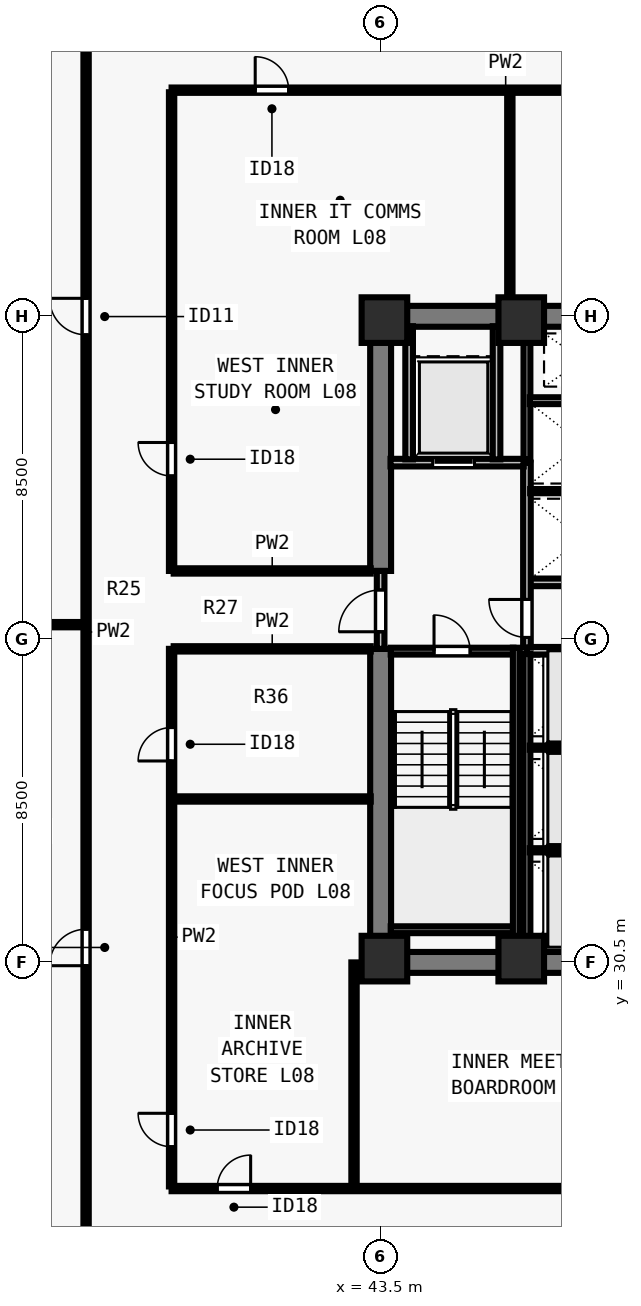
"""IFC4 building model, lengths in metres.
Left out: names, types, materials, properties, quantities, classifications, styles, units other than length and angle.
Written with IfcOpenShell. Run it as: python <this file> out.ifc"""

import sys

from ifc_helpers import new_model, si_unit, direction, frame, frame_2d, origin, origin_2d, place, context, subcontext, project, spatial, rectangle, extrude, element, fill, save


model = new_model("IFC4")
c1 = context("Model", 3, precision=1e-05, world=origin(), true_north=direction((0.0, 1.0)))
c2 = subcontext(c1, "Body", "Model", "MODEL_VIEW")
j1 = project(units=[si_unit("LENGTHUNIT", "METRE"), si_unit("PLANEANGLEUNIT", "RADIAN")], contexts=[c1])
p1 = place(None, origin())
s1 = spatial("IfcSite", under=j1, at=p1, CompositionType="ELEMENT")
p2 = place(p1, origin())
s2 = spatial("IfcBuilding", under=s1, at=p2, CompositionType="ELEMENT")
p3 = place(p2, frame((0.0, 0.0, 34.0)))
s3 = spatial("IfcBuildingStorey", under=s2, at=p3, CompositionType="ELEMENT", Elevation=34.0)
for number, where, z_axis, x_axis in (
    (1, (43.6, 30.6, 0.0), (0.0, 0.0, 1.0), (1.0, 0.0, 0.0)),
    (2, (47.2, 30.6, 0.0), (0.0, 0.0, 1.0), (1.0, 0.0, 0.0)),
    (3, (43.6, 47.4, 0.0), (0.0, 0.0, 1.0), (1.0, 0.0, 0.0)),
    (4, (47.2, 47.4, 0.0), (0.0, 0.0, 1.0), (1.0, 0.0, 0.0)),
):
    element("IfcColumn", number, at=place(p3, frame(where, z_axis=z_axis, x_axis=x_axis)), inside=s3, PredefinedType="COLUMN", context=c2, shape_type="SweptSolid", body=[
        extrude(rectangle(XDim=1.2, YDim=1.2, at=origin_2d()), origin(), (0.0, 0.0, 1.0), 3.5),
    ])
for number, where, z_axis, x_axis in (
    (5, (43.225, 30.5, 0.0), (0.0, 0.0, 1.0), (1.0, 0.0, 0.0)),
    (6, (43.225, 47.5, 0.0), (0.0, 0.0, 1.0), (1.0, 0.0, 0.0)),
):
    element("IfcWall", number, at=place(p3, frame(where, z_axis=z_axis, x_axis=x_axis)), inside=s3, PredefinedType="SHEAR", context=c2, shape_type="SweptSolid", body=[
        extrude(rectangle(XDim=17.55, YDim=0.55, at=frame_2d((8.775, 0.0))), origin(), (0.0, 0.0, 1.0), 3.28),
    ])
p4 = place(p3, frame((43.5, 30.765, 0.0), z_axis=(0.0, 0.0, 1.0), x_axis=(0.0, 1.0, 0.0)))
e7 = element("IfcWall", 7, at=p4, inside=s3, PredefinedType="SHEAR", context=c2, shape_type="SweptSolid", body=[
    extrude(rectangle(XDim=7.985, YDim=0.55, at=frame_2d((3.993, 0.0))), origin(), (0.0, 0.0, 1.0), 3.28),
])
p5 = place(p3, frame((43.5, 40.8, 0.0), z_axis=(0.0, 0.0, 1.0), x_axis=(0.0, 1.0, 0.0)))
e8 = element("IfcWall", 8, at=p5, inside=s3, PredefinedType="SHEAR", context=c2, shape_type="SweptSolid", body=[
    extrude(rectangle(XDim=6.435, YDim=0.55, at=frame_2d((3.218, 0.0))), origin(), (0.0, 0.0, 1.0), 3.28),
])
for number, where, z_axis, x_axis in (
    (9, (47.35, 38.7, 0.0), (0.0, 0.0, 1.0), (1.0, 0.0, 0.0)),
    (10, (47.35, 40.5, 0.0), (0.0, 0.0, 1.0), (1.0, 0.0, 0.0)),
):
    element("IfcWall", number, at=place(p3, frame(where, z_axis=z_axis, x_axis=x_axis)), inside=s3, PredefinedType="SOLIDWALL", context=c2, shape_type="SweptSolid", body=[
        extrude(rectangle(XDim=2.95, YDim=0.2, at=frame_2d((1.475, 0.0))), origin(), (0.0, 0.0, 1.0), 3.28),
    ])
p6 = place(p3, frame((43.5, 38.75, 0.0), z_axis=(0.0, 0.0, 1.0), x_axis=(0.0, 1.0, 0.0)))
e11 = element("IfcWall", 11, at=p6, inside=s3, PredefinedType="SOLIDWALL", context=c2, shape_type="SweptSolid", body=[
    extrude(rectangle(XDim=2.05, YDim=0.2, at=frame_2d((1.025, 0.0))), origin(), (0.0, 0.0, 1.0), 3.28),
])
p7 = place(p6, frame((0.45, 0.0, 0.0)))
e12 = element("IfcOpeningElement", 12, at=p7, cuts=e11, PredefinedType="OPENING", context=c2, shape_type="SweptSolid", body=[
    extrude(rectangle(XDim=1.1, YDim=2.15, at=frame_2d((0.55, 1.075))), frame((0.0, 0.11, 0.0), z_axis=(0.0, -1.0, 0.0), x_axis=(1.0, 0.0, 0.0)), (0.0, 0.0, 1.0), 0.22),
])
p8 = place(p3, frame((47.35, 38.785, 0.0), z_axis=(0.0, 0.0, 1.0), x_axis=(0.0, 1.0, 0.0)))
e13 = element("IfcWall", 13, at=p8, inside=s3, PredefinedType="SOLIDWALL", context=c2, shape_type="SweptSolid", body=[
    extrude(rectangle(XDim=4.865, YDim=0.2, at=frame_2d((2.433, 0.0))), origin(), (0.0, 0.0, 1.0), 3.28),
])
p9 = place(p8, frame((0.265, 0.0, 0.0)))
e14 = element("IfcOpeningElement", 14, at=p9, cuts=e13, PredefinedType="OPENING", context=c2, shape_type="SweptSolid", body=[
    extrude(rectangle(XDim=1.0, YDim=2.15, at=frame_2d((0.5, 1.075))), frame((0.0, 0.11, 0.0), z_axis=(0.0, -1.0, 0.0), x_axis=(1.0, 0.0, 0.0)), (0.0, 0.0, 1.0), 0.22),
])
p10 = place(p3, frame((43.76, 43.65, 0.0), z_axis=(0.0, 0.0, 1.0), x_axis=(1.0, 0.0, 0.0)))
e15 = element("IfcWall", 15, at=p10, inside=s3, PredefinedType="SOLIDWALL", context=c2, shape_type="SweptSolid", body=[
    extrude(rectangle(XDim=3.505, YDim=0.2, at=frame_2d((1.752, 0.0))), origin(), (0.0, 0.0, 1.0), 3.28),
])
p11 = place(p10, frame((1.11, 0.0, 0.0)))
e16 = element("IfcOpeningElement", 16, at=p11, cuts=e15, PredefinedType="OPENING", context=c2, shape_type="SweptSolid", body=[
    extrude(rectangle(XDim=1.1, YDim=2.2, at=frame_2d((0.55, 1.1))), frame((0.0, 0.11, 0.0), z_axis=(0.0, -1.0, 0.0), x_axis=(1.0, 0.0, 0.0)), (0.0, 0.0, 1.0), 0.22),
])
for number, where, z_axis, x_axis in (
    (17, (46.55, 43.735, 0.0), (0.0, 0.0, 1.0), (0.0, 1.0, 0.0)),
    (18, (44.25, 43.735, 0.0), (0.0, 0.0, 1.0), (0.0, 1.0, 0.0)),
):
    element("IfcWall", number, at=place(p3, frame(where, z_axis=z_axis, x_axis=x_axis)), inside=s3, PredefinedType="SOLIDWALL", context=c2, shape_type="SweptSolid", body=[
        extrude(rectangle(XDim=3.505, YDim=0.2, at=frame_2d((1.752, 0.0))), origin(), (0.0, 0.0, 1.0), 3.28),
    ])
p12 = place(p3, frame((47.35, 30.76, 0.0), z_axis=(0.0, 0.0, 1.0), x_axis=(0.0, 1.0, 0.0)))
e19 = element("IfcWall", 19, at=p12, inside=s3, PredefinedType="SOLIDWALL", context=c2, shape_type="SweptSolid", body=[
    extrude(rectangle(XDim=7.855, YDim=0.18, at=frame_2d((3.927, 0.0))), origin(), (0.0, 0.0, 1.0), 3.28),
])
for number, where, z_axis, x_axis in (
    (20, (47.425, 33.45, 0.0), (0.0, 0.0, 1.0), (1.0, 0.0, 0.0)),
    (21, (47.425, 36.15, 0.0), (0.0, 0.0, 1.0), (1.0, 0.0, 0.0)),
):
    element("IfcWall", number, at=place(p3, frame(where, z_axis=z_axis, x_axis=x_axis)), inside=s3, PredefinedType="PARTITIONING", context=c2, shape_type="SweptSolid", body=[
        extrude(rectangle(XDim=2.79, YDim=0.11, at=frame_2d((1.395, 0.0))), origin(), (0.0, 0.0, 1.0), 3.28),
    ])
p13 = place(p3, frame((47.35, 43.735, 0.0), z_axis=(0.0, 0.0, 1.0), x_axis=(0.0, 1.0, 0.0)))
e22 = element("IfcWall", 22, at=p13, inside=s3, PredefinedType="SOLIDWALL", context=c2, shape_type="SweptSolid", body=[
    extrude(rectangle(XDim=3.505, YDim=0.18, at=frame_2d((1.752, 0.0))), origin(), (0.0, 0.0, 1.0), 3.28),
])
p14 = place(p3, frame((47.435, 42.9, 0.0), z_axis=(0.0, 0.0, 1.0), x_axis=(1.0, 0.0, 0.0)))
e23 = element("IfcWall", 23, at=p14, inside=s3, PredefinedType="PARTITIONING", context=c2, shape_type="SweptSolid", body=[
    extrude(rectangle(XDim=2.78, YDim=0.11, at=frame_2d((1.39, 0.0))), origin(), (0.0, 0.0, 1.0), 3.28),
])
p15 = place(p3, frame((47.425, 45.28, 0.0), z_axis=(0.0, 0.0, 1.0), x_axis=(1.0, 0.0, 0.0)))
e24 = element("IfcWall", 24, at=p15, inside=s3, PredefinedType="SOLIDWALL", context=c2, shape_type="SweptSolid", body=[
    extrude(rectangle(XDim=2.79, YDim=0.18, at=frame_2d((1.395, 0.0))), origin(), (0.0, 0.0, 1.0), 3.28),
])
p16 = place(p3, frame((35.75, 22.355, 0.0), z_axis=(0.0, 0.0, 1.0), x_axis=(0.0, 1.0, 0.0)))
e25 = element("IfcWall", 25, at=p16, inside=s3, PredefinedType="PARTITIONING", context=c2, shape_type="SweptSolid", body=[
    extrude(rectangle(XDim=33.29, YDim=0.14, at=frame_2d((16.645, 0.0))), origin(), (0.0, 0.0, 1.0), 3.28),
])
p17 = place(p16, frame((8.058, 0.0, 0.0)))
e26 = element("IfcOpeningElement", 26, at=p17, cuts=e25, PredefinedType="OPENING", context=c2, shape_type="SweptSolid", body=[
    extrude(rectangle(XDim=0.96, YDim=2.12, at=frame_2d((0.48, 1.06))), frame((0.0, 0.08, 0.0), z_axis=(0.0, -1.0, 0.0), x_axis=(1.0, 0.0, 0.0)), (0.0, 0.0, 1.0), 0.16),
])
p18 = place(p16, frame((24.658, 0.0, 0.0)))
e27 = element("IfcOpeningElement", 27, at=p18, cuts=e25, PredefinedType="OPENING", context=c2, shape_type="SweptSolid", body=[
    extrude(rectangle(XDim=0.96, YDim=2.12, at=frame_2d((0.48, 1.06))), frame((0.0, 0.08, 0.0), z_axis=(0.0, -1.0, 0.0), x_axis=(1.0, 0.0, 0.0)), (0.0, 0.0, 1.0), 0.16),
])
p19 = place(p3, frame((38.0, 24.55, 0.0), z_axis=(0.0, 0.0, 1.0), x_axis=(1.0, 0.0, 0.0)))
e28 = element("IfcWall", 28, at=p19, inside=s3, PredefinedType="PARTITIONING", context=c2, shape_type="SweptSolid", body=[
    extrude(rectangle(XDim=28.0, YDim=0.14, at=frame_2d((14.0, 0.0))), origin(), (0.0, 0.0, 1.0), 3.28),
])
p20 = place(p19, frame((1.2, 0.0, 0.0)))
e29 = element("IfcOpeningElement", 29, at=p20, cuts=e28, PredefinedType="OPENING", context=c2, shape_type="SweptSolid", body=[
    extrude(rectangle(XDim=0.88, YDim=2.1, at=frame_2d((0.44, 1.05))), frame((0.0, 0.08, 0.0), z_axis=(0.0, -1.0, 0.0), x_axis=(1.0, 0.0, 0.0)), (0.0, 0.0, 1.0), 0.16),
])
p21 = place(p19, frame((10.5, 0.0, 0.0)))
e30 = element("IfcOpeningElement", 30, at=p21, cuts=e28, PredefinedType="OPENING", context=c2, shape_type="SweptSolid", body=[
    extrude(rectangle(XDim=0.88, YDim=2.1, at=frame_2d((0.44, 1.05))), frame((0.0, 0.08, 0.0), z_axis=(0.0, -1.0, 0.0), x_axis=(1.0, 0.0, 0.0)), (0.0, 0.0, 1.0), 0.16),
])
p22 = place(p19, frame((21.0, 0.0, 0.0)))
e31 = element("IfcOpeningElement", 31, at=p22, cuts=e28, PredefinedType="OPENING", context=c2, shape_type="SweptSolid", body=[
    extrude(rectangle(XDim=0.88, YDim=2.1, at=frame_2d((0.44, 1.05))), frame((0.0, 0.08, 0.0), z_axis=(0.0, -1.0, 0.0), x_axis=(1.0, 0.0, 0.0)), (0.0, 0.0, 1.0), 0.16),
])
p23 = place(p3, frame((38.0, 53.45, 0.0), z_axis=(0.0, 0.0, 1.0), x_axis=(1.0, 0.0, 0.0)))
e32 = element("IfcWall", 32, at=p23, inside=s3, PredefinedType="PARTITIONING", context=c2, shape_type="SweptSolid", body=[
    extrude(rectangle(XDim=28.0, YDim=0.14, at=frame_2d((14.0, 0.0))), origin(), (0.0, 0.0, 1.0), 3.28),
])
p24 = place(p23, frame((2.2, 0.0, 0.0)))
e33 = element("IfcOpeningElement", 33, at=p24, cuts=e32, PredefinedType="OPENING", context=c2, shape_type="SweptSolid", body=[
    extrude(rectangle(XDim=0.88, YDim=2.1, at=frame_2d((0.44, 1.05))), frame((0.0, 0.08, 0.0), z_axis=(0.0, -1.0, 0.0), x_axis=(1.0, 0.0, 0.0)), (0.0, 0.0, 1.0), 0.16),
])
p25 = place(p23, frame((14.5, 0.0, 0.0)))
e34 = element("IfcOpeningElement", 34, at=p25, cuts=e32, PredefinedType="OPENING", context=c2, shape_type="SweptSolid", body=[
    extrude(rectangle(XDim=0.88, YDim=2.1, at=frame_2d((0.44, 1.05))), frame((0.0, 0.08, 0.0), z_axis=(0.0, -1.0, 0.0), x_axis=(1.0, 0.0, 0.0)), (0.0, 0.0, 1.0), 0.16),
])
p26 = place(p23, frame((24.0, 0.0, 0.0)))
e35 = element("IfcOpeningElement", 35, at=p26, cuts=e32, PredefinedType="OPENING", context=c2, shape_type="SweptSolid", body=[
    extrude(rectangle(XDim=0.88, YDim=2.1, at=frame_2d((0.44, 1.05))), frame((0.0, 0.08, 0.0), z_axis=(0.0, -1.0, 0.0), x_axis=(1.0, 0.0, 0.0)), (0.0, 0.0, 1.0), 0.16),
])
p27 = place(p3, frame((38.0, 24.605, 0.0), z_axis=(0.0, 0.0, 1.0), x_axis=(0.0, 1.0, 0.0)))
e36 = element("IfcWall", 36, at=p27, inside=s3, PredefinedType="PARTITIONING", context=c2, shape_type="SweptSolid", body=[
    extrude(rectangle(XDim=14.145, YDim=0.14, at=frame_2d((7.073, 0.0))), origin(), (0.0, 0.0, 1.0), 3.28),
])
p28 = place(p27, frame((1.045, 0.0, 0.0)))
e37 = element("IfcOpeningElement", 37, at=p28, cuts=e36, PredefinedType="OPENING", context=c2, shape_type="SweptSolid", body=[
    extrude(rectangle(XDim=0.88, YDim=2.1, at=frame_2d((0.44, 1.05))), frame((0.0, 0.08, 0.0), z_axis=(0.0, -1.0, 0.0), x_axis=(1.0, 0.0, 0.0)), (0.0, 0.0, 1.0), 0.16),
])
p29 = place(p27, frame((11.195, 0.0, 0.0)))
e38 = element("IfcOpeningElement", 38, at=p29, cuts=e36, PredefinedType="OPENING", context=c2, shape_type="SweptSolid", body=[
    extrude(rectangle(XDim=0.88, YDim=2.1, at=frame_2d((0.44, 1.05))), frame((0.0, 0.08, 0.0), z_axis=(0.0, -1.0, 0.0), x_axis=(1.0, 0.0, 0.0)), (0.0, 0.0, 1.0), 0.16),
])
p30 = place(p3, frame((38.0, 40.8, 0.0), z_axis=(0.0, 0.0, 1.0), x_axis=(0.0, 1.0, 0.0)))
e39 = element("IfcWall", 39, at=p30, inside=s3, PredefinedType="PARTITIONING", context=c2, shape_type="SweptSolid", body=[
    extrude(rectangle(XDim=12.595, YDim=0.14, at=frame_2d((6.297, 0.0))), origin(), (0.0, 0.0, 1.0), 3.28),
])
p31 = place(p30, frame((2.5, 0.0, 0.0)))
e40 = element("IfcOpeningElement", 40, at=p31, cuts=e39, PredefinedType="OPENING", context=c2, shape_type="SweptSolid", body=[
    extrude(rectangle(XDim=0.88, YDim=2.1, at=frame_2d((0.44, 1.05))), frame((0.0, 0.08, 0.0), z_axis=(0.0, -1.0, 0.0), x_axis=(1.0, 0.0, 0.0)), (0.0, 0.0, 1.0), 0.16),
])
for number, where, z_axis, x_axis in (
    (41, (38.055, 38.75, 0.0), (0.0, 0.0, 1.0), (1.0, 0.0, 0.0)),
    (42, (38.055, 40.8, 0.0), (0.0, 0.0, 1.0), (1.0, 0.0, 0.0)),
):
    element("IfcWall", number, at=place(p3, frame(where, z_axis=z_axis, x_axis=x_axis)), inside=s3, PredefinedType="PARTITIONING", context=c2, shape_type="SweptSolid", body=[
        extrude(rectangle(XDim=5.185, YDim=0.14, at=frame_2d((2.593, 0.0))), origin(), (0.0, 0.0, 1.0), 3.28),
    ])
p32 = place(p3, frame((42.8, 24.605, 0.0), z_axis=(0.0, 0.0, 1.0), x_axis=(0.0, 1.0, 0.0)))
e43 = element("IfcWall", 43, at=p32, inside=s3, PredefinedType="PARTITIONING", context=c2, shape_type="SweptSolid", body=[
    extrude(rectangle(XDim=5.895, YDim=0.14, at=frame_2d((2.948, 0.0))), origin(), (0.0, 0.0, 1.0), 2.439),
])
p33 = place(p3, frame((46.9, 47.76, 0.0), z_axis=(0.0, 0.0, 1.0), x_axis=(0.0, 1.0, 0.0)))
e44 = element("IfcWall", 44, at=p33, inside=s3, PredefinedType="PARTITIONING", context=c2, shape_type="SweptSolid", body=[
    extrude(rectangle(XDim=5.635, YDim=0.14, at=frame_2d((2.817, 0.0))), origin(), (0.0, 0.0, 1.0), 3.28),
])
p34 = place(p3, frame((38.055, 34.8, 0.0), z_axis=(0.0, 0.0, 1.0), x_axis=(1.0, 0.0, 0.0)))
e45 = element("IfcWall", 45, at=p34, inside=s3, PredefinedType="PARTITIONING", context=c2, shape_type="SweptSolid", body=[
    extrude(rectangle(XDim=5.185, YDim=0.14, at=frame_2d((2.593, 0.0))), origin(), (0.0, 0.0, 1.0), 3.28),
])
p35 = place(p3, frame((26.92, 39.387, 0.0), z_axis=(0.0, 0.0, 1.0), x_axis=(1.0, 0.0, 0.0)))
e46 = element("IfcWall", 46, at=p35, inside=s3, PredefinedType="PARTITIONING", context=c2, shape_type="SweptSolid", body=[
    extrude(rectangle(XDim=8.73, YDim=0.14, at=frame_2d((4.365, 0.0))), origin(), (0.0, 0.0, 1.0), 2.849),
])
p36 = place(p3, frame((43.765, 38.69, 0.0), z_axis=(0.0, 0.0, 1.0), x_axis=(1.0, 0.0, 0.0)))
e47 = element("IfcWall", 47, at=p36, inside=s3, PredefinedType="SOLIDWALL", context=c2, shape_type="SweptSolid", body=[
    extrude(rectangle(XDim=3.23, YDim=0.18, at=frame_2d((1.615, 0.0))), origin(), (0.0, 0.0, 1.0), 3.28),
])
p37 = place(p36, frame((1.14, 0.0, 0.0)))
e48 = element("IfcOpeningElement", 48, at=p37, cuts=e47, PredefinedType="OPENING", context=c2, shape_type="SweptSolid", body=[
    extrude(rectangle(XDim=0.95, YDim=2.15, at=frame_2d((0.475, 1.075))), frame((0.0, 0.1, 0.0), z_axis=(0.0, -1.0, 0.0), x_axis=(1.0, 0.0, 0.0)), (0.0, 0.0, 1.0), 0.2),
])
p38 = place(p3, frame((43.765, 31.36, 0.0), z_axis=(0.0, 0.0, 1.0), x_axis=(1.0, 0.0, 0.0)))
e49 = element("IfcWall", 49, at=p38, inside=s3, PredefinedType="SOLIDWALL", context=c2, shape_type="SweptSolid", body=[
    extrude(rectangle(XDim=3.23, YDim=0.18, at=frame_2d((1.615, 0.0))), origin(), (0.0, 0.0, 1.0), 3.28),
])
p39 = place(p3, frame((47.07, 38.78, 0.0), z_axis=(0.0, 0.0, 1.0), x_axis=(0.0, -1.0, 0.0)))
e50 = element("IfcWall", 50, at=p39, inside=s3, PredefinedType="SOLIDWALL", context=c2, shape_type="SweptSolid", body=[
    extrude(rectangle(XDim=8.017, YDim=0.18, at=frame_2d((4.009, 0.0))), origin(), (0.0, 0.0, 1.0), 3.28),
])
p40 = place(p7, origin())
e51 = element("IfcDoor", 51, at=p40, inside=s3, OperationType="SINGLE_SWING_LEFT", PredefinedType="DOOR", context=c2, shape_type="SweptSolid", body=[
    extrude(rectangle(XDim=1.1, YDim=2.15, at=frame_2d((0.55, 1.075))), frame((0.0, 0.025, 0.0), z_axis=(0.0, -1.0, 0.0), x_axis=(1.0, 0.0, 0.0)), (0.0, 0.0, 1.0), 0.05),
])
fill(e12, e51)
p41 = place(p9, origin())
e52 = element("IfcDoor", 52, at=p41, inside=s3, OperationType="SINGLE_SWING_RIGHT", PredefinedType="DOOR", context=c2, shape_type="SweptSolid", body=[
    extrude(rectangle(XDim=1.0, YDim=2.15, at=frame_2d((0.5, 1.075))), frame((0.0, 0.025, 0.0), z_axis=(0.0, -1.0, 0.0), x_axis=(1.0, 0.0, 0.0)), (0.0, 0.0, 1.0), 0.05),
])
fill(e14, e52)
p42 = place(p11, origin())
e53 = element("IfcDoor", 53, at=p42, inside=s3, OperationType="SLIDING_TO_LEFT", PredefinedType="DOOR", context=c2, shape_type="SweptSolid", body=[
    extrude(rectangle(XDim=1.1, YDim=2.2, at=frame_2d((0.55, 1.1))), frame((0.0, 0.025, 0.0), z_axis=(0.0, -1.0, 0.0), x_axis=(1.0, 0.0, 0.0)), (0.0, 0.0, 1.0), 0.05),
])
fill(e16, e53)
p43 = place(p20, origin())
e54 = element("IfcDoor", 54, at=p43, inside=s3, OperationType="SINGLE_SWING_RIGHT", PredefinedType="DOOR", context=c2, shape_type="SweptSolid", body=[
    extrude(rectangle(XDim=0.88, YDim=2.1, at=frame_2d((0.44, 1.05))), frame((0.0, 0.025, 0.0), z_axis=(0.0, -1.0, 0.0), x_axis=(1.0, 0.0, 0.0)), (0.0, 0.0, 1.0), 0.05),
])
fill(e29, e54)
p44 = place(p24, origin())
e55 = element("IfcDoor", 55, at=p44, inside=s3, OperationType="SINGLE_SWING_LEFT", PredefinedType="DOOR", context=c2, shape_type="SweptSolid", body=[
    extrude(rectangle(XDim=0.88, YDim=2.1, at=frame_2d((0.44, 1.05))), frame((0.0, 0.025, 0.0), z_axis=(0.0, -1.0, 0.0), x_axis=(1.0, 0.0, 0.0)), (0.0, 0.0, 1.0), 0.05),
])
fill(e33, e55)
p45 = place(p28, origin())
e56 = element("IfcDoor", 56, at=p45, inside=s3, OperationType="SINGLE_SWING_RIGHT", PredefinedType="DOOR", context=c2, shape_type="SweptSolid", body=[
    extrude(rectangle(XDim=0.88, YDim=2.1, at=frame_2d((0.44, 1.05))), frame((0.0, 0.025, 0.0), z_axis=(0.0, -1.0, 0.0), x_axis=(1.0, 0.0, 0.0)), (0.0, 0.0, 1.0), 0.05),
])
fill(e37, e56)
p46 = place(p29, origin())
e57 = element("IfcDoor", 57, at=p46, inside=s3, OperationType="SINGLE_SWING_LEFT", PredefinedType="DOOR", context=c2, shape_type="SweptSolid", body=[
    extrude(rectangle(XDim=0.88, YDim=2.1, at=frame_2d((0.44, 1.05))), frame((0.0, 0.025, 0.0), z_axis=(0.0, -1.0, 0.0), x_axis=(1.0, 0.0, 0.0)), (0.0, 0.0, 1.0), 0.05),
])
fill(e38, e57)
p47 = place(p31, origin())
e58 = element("IfcDoor", 58, at=p47, inside=s3, OperationType="SINGLE_SWING_RIGHT", PredefinedType="DOOR", context=c2, shape_type="SweptSolid", body=[
    extrude(rectangle(XDim=0.88, YDim=2.1, at=frame_2d((0.44, 1.05))), frame((0.0, 0.025, 0.0), z_axis=(0.0, -1.0, 0.0), x_axis=(1.0, 0.0, 0.0)), (0.0, 0.0, 1.0), 0.05),
])
fill(e40, e58)
p48 = place(p17, origin())
e59 = element("IfcDoor", 59, at=p48, inside=s3, OperationType="SINGLE_SWING_LEFT", PredefinedType="DOOR", context=c2, shape_type="SweptSolid", body=[
    extrude(rectangle(XDim=0.96, YDim=2.12, at=frame_2d((0.48, 1.06))), frame((0.0, 0.025, 0.0), z_axis=(0.0, -1.0, 0.0), x_axis=(1.0, 0.0, 0.0)), (0.0, 0.0, 1.0), 0.05),
])
fill(e26, e59)
p49 = place(p18, origin())
e60 = element("IfcDoor", 60, at=p49, inside=s3, OperationType="SINGLE_SWING_RIGHT", PredefinedType="DOOR", context=c2, shape_type="SweptSolid", body=[
    extrude(rectangle(XDim=0.96, YDim=2.12, at=frame_2d((0.48, 1.06))), frame((0.0, 0.025, 0.0), z_axis=(0.0, -1.0, 0.0), x_axis=(1.0, 0.0, 0.0)), (0.0, 0.0, 1.0), 0.05),
])
fill(e27, e60)
p50 = place(p37, origin())
e61 = element("IfcDoor", 61, at=p50, inside=s3, OperationType="SINGLE_SWING_LEFT", PredefinedType="DOOR", context=c2, shape_type="SweptSolid", body=[
    extrude(rectangle(XDim=0.95, YDim=2.15, at=frame_2d((0.475, 1.075))), frame((0.0, 0.025, 0.0), z_axis=(0.0, -1.0, 0.0), x_axis=(1.0, 0.0, 0.0)), (0.0, 0.0, 1.0), 0.05),
])
fill(e48, e61)
save(model, sys.argv[1])
